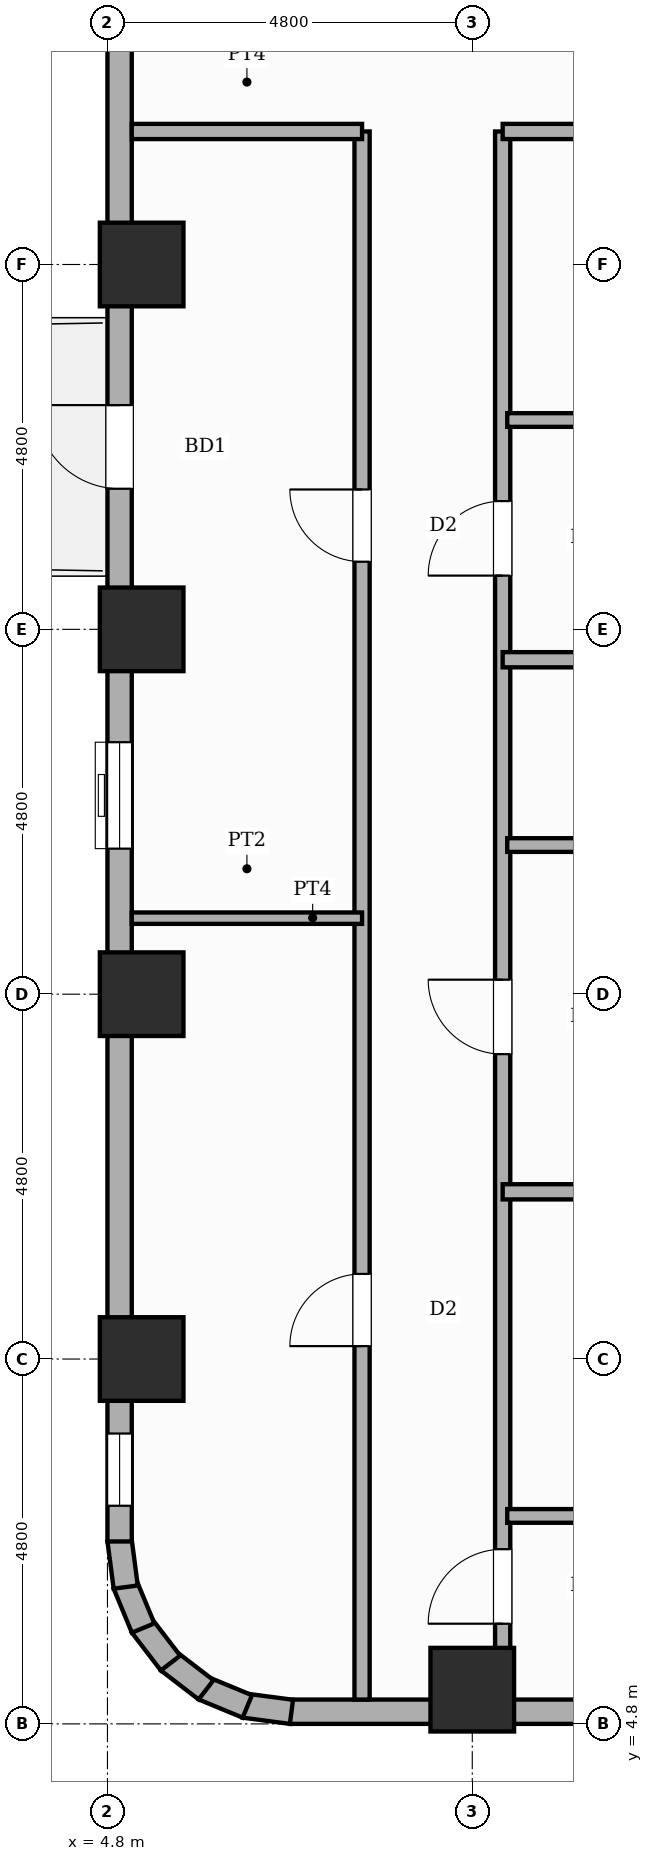
"""IFC4 building model, lengths in metres.
Left out: names, types, materials, properties, quantities, classifications, styles, units other than length and angle.
Written with IfcOpenShell. Run it as: python <this file> out.ifc"""

import sys

from ifc_helpers import new_model, si_unit, direction, frame, frame_2d, origin, origin_2d, place, context, subcontext, project, spatial, rectangle, extrude, element, fill, save


model = new_model("IFC4")
c1 = context("Model", 3, precision=1e-05, world=origin(), true_north=direction((0.0, 1.0)))
c2 = subcontext(c1, "Body", "Model", "MODEL_VIEW")
j1 = project(units=[si_unit("LENGTHUNIT", "METRE"), si_unit("PLANEANGLEUNIT", "RADIAN")], contexts=[c1])
p1 = place(None, origin())
s1 = spatial("IfcSite", under=j1, at=p1, CompositionType="ELEMENT")
p2 = place(p1, origin())
s2 = spatial("IfcBuilding", under=s1, at=p2, CompositionType="ELEMENT")
p3 = place(p2, frame((0.0, 0.0, 68.2)))
s3 = spatial("IfcBuildingStorey", under=s2, at=p3, CompositionType="ELEMENT", Elevation=68.2)
for number, where, z_axis, x_axis in (
    (1, (5.25, 9.6, 0.0), (0.0, 0.0, 1.0), (1.0, 0.0, 0.0)),
    (2, (5.25, 14.4, 0.0), (0.0, 0.0, 1.0), (1.0, 0.0, 0.0)),
    (3, (5.25, 19.2, 0.0), (0.0, 0.0, 1.0), (1.0, 0.0, 0.0)),
    (4, (5.25, 24.0, 0.0), (0.0, 0.0, 1.0), (1.0, 0.0, 0.0)),
    (5, (9.6, 5.25, 0.0), (0.0, 0.0, 1.0), (1.0, 0.0, 0.0)),
):
    element("IfcColumn", number, at=place(p3, frame(where, z_axis=z_axis, x_axis=x_axis)), inside=s3, PredefinedType="COLUMN", context=c2, shape_type="SweptSolid", body=[
        extrude(rectangle(XDim=1.1, YDim=1.1, at=origin_2d()), origin(), (0.0, 0.0, 1.0), 3.6),
    ])
p4 = place(p3, frame((21.6, 4.96, 0.0), z_axis=(0.0, 0.0, 1.0), x_axis=(-1.0, 0.0, 0.0)))
e6 = element("IfcWall", 6, at=p4, inside=s3, PredefinedType="STANDARD", context=c2, shape_type="SweptSolid", body=[
    extrude(rectangle(XDim=14.4, YDim=0.32, at=frame_2d((7.2, 0.0))), origin(), (0.0, 0.0, 1.0), 2.53),
])
p5 = place(p4, frame((5.45, 0.0, 0.45)))
e7 = element("IfcOpeningElement", 7, at=p5, cuts=e6, PredefinedType="OPENING", context=c2, shape_type="SweptSolid", body=[
    extrude(rectangle(XDim=0.95, YDim=1.8, at=frame_2d((0.475, 0.9))), frame((0.0, 0.17, 0.0), z_axis=(0.0, -1.0, 0.0), x_axis=(1.0, 0.0, 0.0)), (0.0, 0.0, 1.0), 0.34),
])
p6 = place(p4, frame((0.47, 0.0, 0.45)))
e8 = element("IfcOpeningElement", 8, at=p6, cuts=e6, PredefinedType="OPENING", context=c2, shape_type="SweptSolid", body=[
    extrude(rectangle(XDim=0.95, YDim=1.8, at=frame_2d((0.475, 0.9))), frame((0.0, 0.17, 0.0), z_axis=(0.0, -1.0, 0.0), x_axis=(1.0, 0.0, 0.0)), (0.0, 0.0, 1.0), 0.34),
])
p7 = place(p3, frame((7.221, 4.958, 0.0), z_axis=(0.0, 0.0, 1.0), x_axis=(-0.991447664465, 0.130504898859, 0.0)))
e9 = element("IfcWall", 9, at=p7, inside=s3, PredefinedType="STANDARD", context=c2, shape_type="SweptSolid", body=[
    extrude(rectangle(XDim=0.627, YDim=0.32, at=frame_2d((0.313, 0.0))), origin(), (0.0, 0.0, 1.0), 3.35),
])
p8 = place(p3, frame((6.64, 5.03, 0.0), z_axis=(0.0, 0.0, 1.0), x_axis=(-0.923836271867, 0.382787856107, 0.0)))
e10 = element("IfcWall", 10, at=p8, inside=s3, PredefinedType="STANDARD", context=c2, shape_type="SweptSolid", body=[
    extrude(rectangle(XDim=0.626, YDim=0.32, at=frame_2d((0.313, 0.0))), origin(), (0.0, 0.0, 1.0), 3.35),
])
for number, where, z_axis, x_axis in (
    (11, (6.097, 5.248, 0.0), (0.0, 0.0, 1.0), (-0.793, 0.609, 0.0)),
    (12, (5.63, 5.6, 0.0), (0.0, 0.0, 1.0), (-0.609, 0.793, 0.0)),
):
    element("IfcWall", number, at=place(p3, frame(where, z_axis=z_axis, x_axis=x_axis)), inside=s3, PredefinedType="STANDARD", context=c2, shape_type="SweptSolid", body=[
        extrude(rectangle(XDim=0.627, YDim=0.32, at=frame_2d((0.313, 0.0))), origin(), (0.0, 0.0, 1.0), 3.35),
    ])
p9 = place(p3, frame((5.269, 6.061, 0.0), z_axis=(0.0, 0.0, 1.0), x_axis=(-0.382787856107, 0.923836271867, 0.0)))
e13 = element("IfcWall", 13, at=p9, inside=s3, PredefinedType="STANDARD", context=c2, shape_type="SweptSolid", body=[
    extrude(rectangle(XDim=0.626, YDim=0.32, at=frame_2d((0.313, 0.0))), origin(), (0.0, 0.0, 1.0), 3.35),
])
p10 = place(p3, frame((5.04, 6.6, 0.0), z_axis=(0.0, 0.0, 1.0), x_axis=(-0.130504898859, 0.991447664465, 0.0)))
e14 = element("IfcWall", 14, at=p10, inside=s3, PredefinedType="STANDARD", context=c2, shape_type="SweptSolid", body=[
    extrude(rectangle(XDim=0.627, YDim=0.32, at=frame_2d((0.313, 0.0))), origin(), (0.0, 0.0, 1.0), 3.35),
])
p11 = place(p3, frame((4.96, 7.2, 0.0), z_axis=(0.0, 0.0, 1.0), x_axis=(0.0, 1.0, 0.0)))
e15 = element("IfcWall", 15, at=p11, inside=s3, PredefinedType="STANDARD", context=c2, shape_type="SweptSolid", body=[
    extrude(rectangle(XDim=38.4, YDim=0.32, at=frame_2d((19.2, 0.0))), origin(), (0.0, 0.0, 1.0), 2.53),
])
p12 = place(p11, frame((13.85, 0.0, 0.0)))
e16 = element("IfcOpeningElement", 16, at=p12, cuts=e15, PredefinedType="OPENING", context=c2, shape_type="SweptSolid", body=[
    extrude(rectangle(XDim=1.1, YDim=2.15, at=frame_2d((0.55, 1.075))), frame((0.0, 0.17, 0.0), z_axis=(0.0, -1.0, 0.0), x_axis=(1.0, 0.0, 0.0)), (0.0, 0.0, 1.0), 0.34),
])
p13 = place(p11, frame((0.47, 0.0, 0.45)))
e17 = element("IfcOpeningElement", 17, at=p13, cuts=e15, PredefinedType="OPENING", context=c2, shape_type="SweptSolid", body=[
    extrude(rectangle(XDim=0.95, YDim=1.8, at=frame_2d((0.475, 0.9))), frame((0.0, 0.17, 0.0), z_axis=(0.0, -1.0, 0.0), x_axis=(1.0, 0.0, 0.0)), (0.0, 0.0, 1.0), 0.34),
])
p14 = place(p11, frame((9.115, 0.0, 0.65)))
e18 = element("IfcOpeningElement", 18, at=p14, cuts=e15, PredefinedType="OPENING", context=c2, shape_type="SweptSolid", body=[
    extrude(rectangle(XDim=1.4, YDim=1.1, at=frame_2d((0.7, 0.55))), frame((0.0, 0.17, 0.0), z_axis=(0.0, -1.0, 0.0), x_axis=(1.0, 0.0, 0.0)), (0.0, 0.0, 1.0), 0.34),
])
p15 = place(p3, frame((8.15, 5.12, 0.0), z_axis=(0.0, 0.0, 1.0), x_axis=(0.0, 1.0, 0.0)))
e19 = element("IfcWall", 19, at=p15, inside=s3, PredefinedType="PARTITIONING", context=c2, shape_type="SweptSolid", body=[
    extrude(rectangle(XDim=20.63, YDim=0.2, at=frame_2d((10.315, 0.0))), origin(), (0.0, 0.0, 1.0), 3.35),
])
p16 = place(p15, frame((4.65, 0.0, 0.0)))
e20 = element("IfcOpeningElement", 20, at=p16, cuts=e19, PredefinedType="OPENING", context=c2, shape_type="SweptSolid", body=[
    extrude(rectangle(XDim=0.95, YDim=2.15, at=frame_2d((0.475, 1.075))), frame((0.0, 0.11, 0.0), z_axis=(0.0, -1.0, 0.0), x_axis=(1.0, 0.0, 0.0)), (0.0, 0.0, 1.0), 0.22),
])
p17 = place(p15, frame((14.97, 0.0, 0.0)))
e21 = element("IfcOpeningElement", 21, at=p17, cuts=e19, PredefinedType="OPENING", context=c2, shape_type="SweptSolid", body=[
    extrude(rectangle(XDim=0.95, YDim=2.15, at=frame_2d((0.475, 1.075))), frame((0.0, 0.11, 0.0), z_axis=(0.0, -1.0, 0.0), x_axis=(1.0, 0.0, 0.0)), (0.0, 0.0, 1.0), 0.22),
])
p18 = place(p3, frame((10.0, 5.12, 0.0), z_axis=(0.0, 0.0, 1.0), x_axis=(0.0, 1.0, 0.0)))
e22 = element("IfcWall", 22, at=p18, inside=s3, PredefinedType="PARTITIONING", context=c2, shape_type="SweptSolid", body=[
    extrude(rectangle(XDim=20.63, YDim=0.2, at=frame_2d((10.315, 0.0))), origin(), (0.0, 0.0, 1.0), 3.35),
])
p19 = place(p18, frame((0.998, 0.0, 0.0)))
e23 = element("IfcOpeningElement", 23, at=p19, cuts=e22, PredefinedType="OPENING", context=c2, shape_type="SweptSolid", body=[
    extrude(rectangle(XDim=0.98, YDim=2.18, at=frame_2d((0.49, 1.09))), frame((0.0, 0.11, 0.0), z_axis=(0.0, -1.0, 0.0), x_axis=(1.0, 0.0, 0.0)), (0.0, 0.0, 1.0), 0.22),
])
p20 = place(p18, frame((8.491, 0.0, 0.0)))
e24 = element("IfcOpeningElement", 24, at=p20, cuts=e22, PredefinedType="OPENING", context=c2, shape_type="SweptSolid", body=[
    extrude(rectangle(XDim=0.98, YDim=2.18, at=frame_2d((0.49, 1.09))), frame((0.0, 0.11, 0.0), z_axis=(0.0, -1.0, 0.0), x_axis=(1.0, 0.0, 0.0)), (0.0, 0.0, 1.0), 0.22),
])
p21 = place(p18, frame((14.787, 0.0, 0.0)))
e25 = element("IfcOpeningElement", 25, at=p21, cuts=e22, PredefinedType="OPENING", context=c2, shape_type="SweptSolid", body=[
    extrude(rectangle(XDim=0.98, YDim=2.18, at=frame_2d((0.49, 1.09))), frame((0.0, 0.11, 0.0), z_axis=(0.0, -1.0, 0.0), x_axis=(1.0, 0.0, 0.0)), (0.0, 0.0, 1.0), 0.22),
])
p22 = place(p3, frame((5.12, 25.75, 0.0), z_axis=(0.0, 0.0, 1.0), x_axis=(1.0, 0.0, 0.0)))
e26 = element("IfcWall", 26, at=p22, inside=s3, PredefinedType="PARTITIONING", context=c2, shape_type="SweptSolid", body=[
    extrude(rectangle(XDim=3.03, YDim=0.2, at=frame_2d((1.515, 0.0))), origin(), (0.0, 0.0, 1.0), 3.35),
])
p23 = place(p3, frame((10.0, 25.75, 0.0), z_axis=(0.0, 0.0, 1.0), x_axis=(1.0, 0.0, 0.0)))
e27 = element("IfcWall", 27, at=p23, inside=s3, PredefinedType="PARTITIONING", context=c2, shape_type="SweptSolid", body=[
    extrude(rectangle(XDim=13.68, YDim=0.2, at=frame_2d((6.84, 0.0))), origin(), (0.0, 0.0, 1.0), 3.35),
])
p24 = place(p3, frame((5.12, 15.4, 0.0), z_axis=(0.0, 0.0, 1.0), x_axis=(1.0, 0.0, 0.0)))
e28 = element("IfcWall", 28, at=p24, inside=s3, PredefinedType="PARTITIONING", context=c2, shape_type="SweptSolid", body=[
    extrude(rectangle(XDim=3.03, YDim=0.15, at=frame_2d((1.515, 0.0))), origin(), (0.0, 0.0, 1.0), 3.35),
])
p25 = place(p3, frame((10.06, 7.536, 0.0), z_axis=(0.0, 0.0, 1.0), x_axis=(1.0, 0.0, 0.0)))
e29 = element("IfcWall", 29, at=p25, inside=s3, PredefinedType="PLUMBINGWALL", context=c2, shape_type="SweptSolid", body=[
    extrude(rectangle(XDim=13.62, YDim=0.18, at=frame_2d((6.81, 0.0))), origin(), (0.0, 0.0, 1.0), 3.35),
])
p26 = place(p25, frame((1.091, 0.0, 0.0)))
e30 = element("IfcOpeningElement", 30, at=p26, cuts=e29, PredefinedType="OPENING", context=c2, shape_type="SweptSolid", body=[
    extrude(rectangle(XDim=0.86, YDim=2.1, at=frame_2d((0.43, 1.05))), frame((0.0, 0.1, 0.0), z_axis=(0.0, -1.0, 0.0), x_axis=(1.0, 0.0, 0.0)), (0.0, 0.0, 1.0), 0.2),
])
p27 = place(p25, frame((4.868, 0.0, 0.0)))
e31 = element("IfcOpeningElement", 31, at=p27, cuts=e29, PredefinedType="OPENING", context=c2, shape_type="SweptSolid", body=[
    extrude(rectangle(XDim=0.9, YDim=2.15, at=frame_2d((0.45, 1.075))), frame((0.0, 0.1, 0.0), z_axis=(0.0, -1.0, 0.0), x_axis=(1.0, 0.0, 0.0)), (0.0, 0.0, 1.0), 0.2),
])
p28 = place(p25, frame((9.897, 0.0, 0.0)))
e32 = element("IfcOpeningElement", 32, at=p28, cuts=e29, PredefinedType="OPENING", context=c2, shape_type="SweptSolid", body=[
    extrude(rectangle(XDim=0.9, YDim=2.15, at=frame_2d((0.45, 1.075))), frame((0.0, 0.1, 0.0), z_axis=(0.0, -1.0, 0.0), x_axis=(1.0, 0.0, 0.0)), (0.0, 0.0, 1.0), 0.2),
])
p29 = place(p3, frame((10.0, 11.8, 0.0), z_axis=(0.0, 0.0, 1.0), x_axis=(1.0, 0.0, 0.0)))
e33 = element("IfcWall", 33, at=p29, inside=s3, PredefinedType="SOLIDWALL", context=c2, shape_type="SweptSolid", body=[
    extrude(rectangle(XDim=13.68, YDim=0.2, at=frame_2d((6.84, 0.0))), origin(), (0.0, 0.0, 1.0), 3.35),
])
p30 = place(p3, frame((10.06, 16.362, 0.0), z_axis=(0.0, 0.0, 1.0), x_axis=(1.0, 0.0, 0.0)))
e34 = element("IfcWall", 34, at=p30, inside=s3, PredefinedType="PLUMBINGWALL", context=c2, shape_type="SweptSolid", body=[
    extrude(rectangle(XDim=13.62, YDim=0.18, at=frame_2d((6.81, 0.0))), origin(), (0.0, 0.0, 1.0), 3.35),
])
p31 = place(p30, frame((1.091, 0.0, 0.0)))
e35 = element("IfcOpeningElement", 35, at=p31, cuts=e34, PredefinedType="OPENING", context=c2, shape_type="SweptSolid", body=[
    extrude(rectangle(XDim=0.86, YDim=2.1, at=frame_2d((0.43, 1.05))), frame((0.0, 0.1, 0.0), z_axis=(0.0, -1.0, 0.0), x_axis=(1.0, 0.0, 0.0)), (0.0, 0.0, 1.0), 0.2),
])
p32 = place(p30, frame((4.868, 0.0, 0.0)))
e36 = element("IfcOpeningElement", 36, at=p32, cuts=e34, PredefinedType="OPENING", context=c2, shape_type="SweptSolid", body=[
    extrude(rectangle(XDim=0.9, YDim=2.15, at=frame_2d((0.45, 1.075))), frame((0.0, 0.1, 0.0), z_axis=(0.0, -1.0, 0.0), x_axis=(1.0, 0.0, 0.0)), (0.0, 0.0, 1.0), 0.2),
])
p33 = place(p30, frame((9.897, 0.0, 0.0)))
e37 = element("IfcOpeningElement", 37, at=p33, cuts=e34, PredefinedType="OPENING", context=c2, shape_type="SweptSolid", body=[
    extrude(rectangle(XDim=0.9, YDim=2.15, at=frame_2d((0.45, 1.075))), frame((0.0, 0.1, 0.0), z_axis=(0.0, -1.0, 0.0), x_axis=(1.0, 0.0, 0.0)), (0.0, 0.0, 1.0), 0.2),
])
p34 = place(p3, frame((10.0, 18.8, 0.0), z_axis=(0.0, 0.0, 1.0), x_axis=(1.0, 0.0, 0.0)))
e38 = element("IfcWall", 38, at=p34, inside=s3, PredefinedType="SOLIDWALL", context=c2, shape_type="SweptSolid", body=[
    extrude(rectangle(XDim=13.68, YDim=0.2, at=frame_2d((6.84, 0.0))), origin(), (0.0, 0.0, 1.0), 3.35),
])
p35 = place(p3, frame((10.06, 21.954, 0.0), z_axis=(0.0, 0.0, 1.0), x_axis=(1.0, 0.0, 0.0)))
e39 = element("IfcWall", 39, at=p35, inside=s3, PredefinedType="PLUMBINGWALL", context=c2, shape_type="SweptSolid", body=[
    extrude(rectangle(XDim=13.62, YDim=0.18, at=frame_2d((6.81, 0.0))), origin(), (0.0, 0.0, 1.0), 3.35),
])
p36 = place(p35, frame((1.091, 0.0, 0.0)))
e40 = element("IfcOpeningElement", 40, at=p36, cuts=e39, PredefinedType="OPENING", context=c2, shape_type="SweptSolid", body=[
    extrude(rectangle(XDim=0.86, YDim=2.1, at=frame_2d((0.43, 1.05))), frame((0.0, 0.1, 0.0), z_axis=(0.0, -1.0, 0.0), x_axis=(1.0, 0.0, 0.0)), (0.0, 0.0, 1.0), 0.2),
])
p37 = place(p35, frame((4.868, 0.0, 0.0)))
e41 = element("IfcOpeningElement", 41, at=p37, cuts=e39, PredefinedType="OPENING", context=c2, shape_type="SweptSolid", body=[
    extrude(rectangle(XDim=0.9, YDim=2.15, at=frame_2d((0.45, 1.075))), frame((0.0, 0.1, 0.0), z_axis=(0.0, -1.0, 0.0), x_axis=(1.0, 0.0, 0.0)), (0.0, 0.0, 1.0), 0.2),
])
p38 = place(p35, frame((9.897, 0.0, 0.0)))
e42 = element("IfcOpeningElement", 42, at=p38, cuts=e39, PredefinedType="OPENING", context=c2, shape_type="SweptSolid", body=[
    extrude(rectangle(XDim=0.9, YDim=2.15, at=frame_2d((0.45, 1.075))), frame((0.0, 0.1, 0.0), z_axis=(0.0, -1.0, 0.0), x_axis=(1.0, 0.0, 0.0)), (0.0, 0.0, 1.0), 0.2),
])
p39 = place(p12, origin())
e43 = element("IfcDoor", 43, at=p39, inside=s3, OperationType="SINGLE_SWING_RIGHT", PredefinedType="DOOR", context=c2, shape_type="SweptSolid", body=[
    extrude(rectangle(XDim=1.1, YDim=2.15, at=frame_2d((0.55, 1.075))), frame((0.0, 0.025, 0.0), z_axis=(0.0, -1.0, 0.0), x_axis=(1.0, 0.0, 0.0)), (0.0, 0.0, 1.0), 0.05),
])
fill(e16, e43)
p40 = place(p13, origin())
e44 = element("IfcWindow", 44, at=p40, inside=s3, PartitioningType="SINGLE_PANEL", PredefinedType="WINDOW", context=c2, shape_type="SweptSolid", body=[
    extrude(rectangle(XDim=0.95, YDim=1.8, at=frame_2d((0.475, 0.9))), frame((0.0, 0.03, 0.0), z_axis=(0.0, -1.0, 0.0), x_axis=(1.0, 0.0, 0.0)), (0.0, 0.0, 1.0), 0.06),
])
fill(e17, e44)
p41 = place(p14, origin())
e45 = element("IfcWindow", 45, at=p41, inside=s3, PartitioningType="SINGLE_PANEL", PredefinedType="WINDOW", context=c2, shape_type="SweptSolid", body=[
    extrude(rectangle(XDim=1.4, YDim=1.1, at=frame_2d((0.7, 0.55))), frame((0.0, 0.03, 0.0), z_axis=(0.0, -1.0, 0.0), x_axis=(1.0, 0.0, 0.0)), (0.0, 0.0, 1.0), 0.06),
])
fill(e18, e45)
p42 = place(p16, origin())
e46 = element("IfcDoor", 46, at=p42, inside=s3, OperationType="SINGLE_SWING_LEFT", PredefinedType="DOOR", context=c2, shape_type="SweptSolid", body=[
    extrude(rectangle(XDim=0.95, YDim=2.15, at=frame_2d((0.475, 1.075))), frame((0.0, 0.025, 0.0), z_axis=(0.0, -1.0, 0.0), x_axis=(1.0, 0.0, 0.0)), (0.0, 0.0, 1.0), 0.05),
])
fill(e20, e46)
p43 = place(p17, origin())
e47 = element("IfcDoor", 47, at=p43, inside=s3, OperationType="SINGLE_SWING_RIGHT", PredefinedType="DOOR", context=c2, shape_type="SweptSolid", body=[
    extrude(rectangle(XDim=0.95, YDim=2.15, at=frame_2d((0.475, 1.075))), frame((0.0, 0.025, 0.0), z_axis=(0.0, -1.0, 0.0), x_axis=(1.0, 0.0, 0.0)), (0.0, 0.0, 1.0), 0.05),
])
fill(e21, e47)
p44 = place(p19, origin())
e48 = element("IfcDoor", 48, at=p44, inside=s3, OperationType="SINGLE_SWING_LEFT", PredefinedType="DOOR", context=c2, shape_type="SweptSolid", body=[
    extrude(rectangle(XDim=0.98, YDim=2.18, at=frame_2d((0.49, 1.09))), frame((0.0, 0.025, 0.0), z_axis=(0.0, -1.0, 0.0), x_axis=(1.0, 0.0, 0.0)), (0.0, 0.0, 1.0), 0.05),
])
fill(e23, e48)
p45 = place(p20, origin())
e49 = element("IfcDoor", 49, at=p45, inside=s3, OperationType="SINGLE_SWING_RIGHT", PredefinedType="DOOR", context=c2, shape_type="SweptSolid", body=[
    extrude(rectangle(XDim=0.98, YDim=2.18, at=frame_2d((0.49, 1.09))), frame((0.0, 0.025, 0.0), z_axis=(0.0, -1.0, 0.0), x_axis=(1.0, 0.0, 0.0)), (0.0, 0.0, 1.0), 0.05),
])
fill(e24, e49)
p46 = place(p21, origin())
e50 = element("IfcDoor", 50, at=p46, inside=s3, OperationType="SINGLE_SWING_LEFT", PredefinedType="DOOR", context=c2, shape_type="SweptSolid", body=[
    extrude(rectangle(XDim=0.98, YDim=2.18, at=frame_2d((0.49, 1.09))), frame((0.0, 0.025, 0.0), z_axis=(0.0, -1.0, 0.0), x_axis=(1.0, 0.0, 0.0)), (0.0, 0.0, 1.0), 0.05),
])
fill(e25, e50)
save(model, sys.argv[1])
